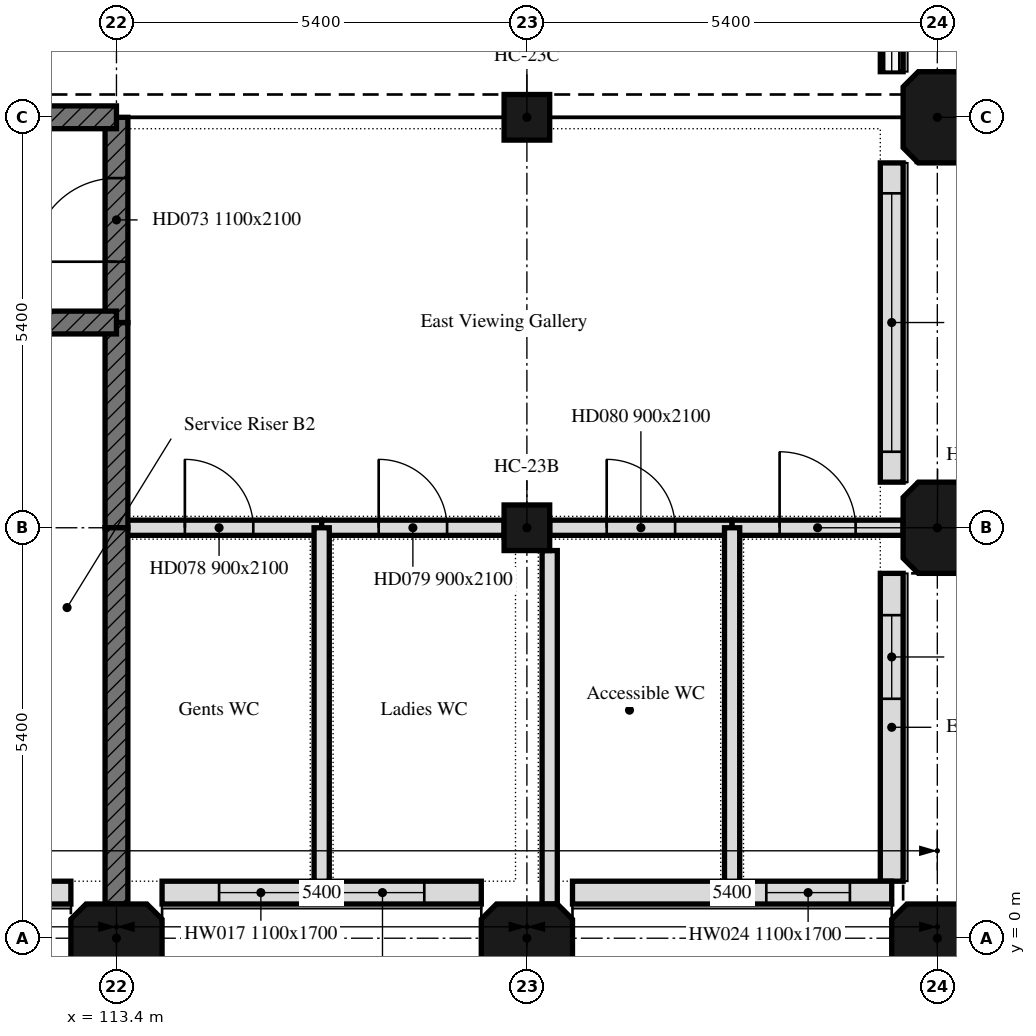
"""IFC4 building model, lengths in metres.
Left out: names, types, materials, properties, quantities, classifications, styles, units other than length and angle.
Written with IfcOpenShell. Run it as: python <this file> out.ifc"""

import sys

from ifc_helpers import new_model, si_unit, direction, frame, frame_2d, origin, origin_2d, place, context, subcontext, project, spatial, polyline, rectangle, outline, extrude, element, fill, save


model = new_model("IFC4")
c1 = context("Model", 3, precision=1e-05, world=origin(), true_north=direction((0.0, 1.0)))
c2 = subcontext(c1, "Body", "Model", "MODEL_VIEW")
j1 = project(units=[si_unit("LENGTHUNIT", "METRE"), si_unit("PLANEANGLEUNIT", "RADIAN")], contexts=[c1])
p1 = place(None, origin())
s1 = spatial("IfcSite", under=j1, at=p1, CompositionType="ELEMENT")
p2 = place(p1, origin())
s2 = spatial("IfcBuilding", under=s1, at=p2, CompositionType="ELEMENT")
p3 = place(p2, frame((0.0, 0.0, 19.8)))
s3 = spatial("IfcBuildingStorey", under=s2, at=p3, CompositionType="ELEMENT", Elevation=19.8)
for number, where, z_axis, x_axis in (
    (1, (113.4, 0.0, 0.0), (0.0, 0.0, 1.0), (1.0, 0.0, 0.0)),
    (2, (118.8, 0.0, 0.0), (0.0, 0.0, 1.0), (1.0, 0.0, 0.0)),
):
    element("IfcColumn", number, at=place(p3, frame(where, z_axis=z_axis, x_axis=x_axis)), inside=s3, PredefinedType="COLUMN", context=c2, shape_type="SweptSolid", body=[
        extrude(outline(polyline([(-0.4, -0.45), (0.4, -0.45), (0.6, -0.25), (0.6, 0.25), (0.4, 0.45), (-0.4, 0.45), (-0.6, 0.25), (-0.6, -0.25), (-0.4, -0.45)])), origin(), (0.0, 0.0, 1.0), 3.802),
    ])
for number, where, z_axis, x_axis in (
    (3, (118.8, 5.4, 0.0), (0.0, 0.0, 1.0), (1.0, 0.0, 0.0)),
    (4, (118.8, 10.8, 0.0), (0.0, 0.0, 1.0), (1.0, 0.0, 0.0)),
):
    element("IfcColumn", number, at=place(p3, frame(where, z_axis=z_axis, x_axis=x_axis)), inside=s3, PredefinedType="COLUMN", context=c2, shape_type="SweptSolid", body=[
        extrude(rectangle(XDim=0.6, YDim=0.6, at=origin_2d()), origin(), (0.0, 0.0, 1.0), 4.8),
    ])
p4 = place(p3, frame((124.2, 0.0, 0.0), z_axis=(0.0, 0.0, 1.0), x_axis=(1.0, 0.0, 0.0)))
e5 = element("IfcColumn", 5, at=p4, inside=s3, PredefinedType="COLUMN", context=c2, shape_type="SweptSolid", body=[
    extrude(outline(polyline([(-0.4, -0.45), (0.4, -0.45), (0.6, -0.25), (0.6, 0.25), (0.4, 0.45), (-0.4, 0.45), (-0.6, 0.25), (-0.6, -0.25), (-0.4, -0.45)])), origin(), (0.0, 0.0, 1.0), 3.802),
])
for number, where, z_axis, x_axis in (
    (6, (124.2, 5.4, 0.0), (0.0, 0.0, 1.0), (0.0, 1.0, 0.0)),
    (7, (124.2, 10.8, 0.0), (0.0, 0.0, 1.0), (0.0, 1.0, 0.0)),
):
    element("IfcColumn", number, at=place(p3, frame(where, z_axis=z_axis, x_axis=x_axis)), inside=s3, PredefinedType="COLUMN", context=c2, shape_type="SweptSolid", body=[
        extrude(outline(polyline([(-0.4, -0.45), (0.4, -0.45), (0.6, -0.25), (0.6, 0.25), (0.4, 0.45), (-0.4, 0.45), (-0.6, 0.25), (-0.6, -0.25), (-0.4, -0.45)])), origin(), (0.0, 0.0, 1.0), 4.8),
    ])
p5 = place(p3, frame((108.6, 0.6, 0.0), z_axis=(0.0, 0.0, 1.0), x_axis=(1.0, 0.0, 0.0)))
e8 = element("IfcWall", 8, at=p5, inside=s3, PredefinedType="SOLIDWALL", context=c2, shape_type="SweptSolid", body=[
    extrude(outline(polyline([(0.0, 0.0), (4.2, 0.0), (4.2, 5.365), (0.0, 5.365), (0.0, 0.0)])), frame((0.0, 0.15, 0.0), z_axis=(0.0, -1.0, 0.0), x_axis=(1.0, 0.0, 0.0)), (0.0, 0.0, 1.0), 0.3),
])
p6 = place(p3, frame((114.0, 0.6, 0.0), z_axis=(0.0, 0.0, 1.0), x_axis=(1.0, 0.0, 0.0)))
e9 = element("IfcWall", 9, at=p6, inside=s3, PredefinedType="SOLIDWALL", context=c2, shape_type="SweptSolid", body=[
    extrude(outline(polyline([(0.0, 0.0), (4.2, 0.0), (4.2, 5.365), (0.0, 5.365), (0.0, 0.0)])), frame((0.0, 0.15, 0.0), z_axis=(0.0, -1.0, 0.0), x_axis=(1.0, 0.0, 0.0)), (0.0, 0.0, 1.0), 0.3),
])
p7 = place(p6, frame((0.75, 0.0, 0.9)))
e10 = element("IfcOpeningElement", 10, at=p7, cuts=e9, PredefinedType="OPENING", context=c2, shape_type="SweptSolid", body=[
    extrude(rectangle(XDim=1.1, YDim=1.7, at=frame_2d((0.55, 0.85))), frame((0.0, 0.15, 0.0), z_axis=(0.0, -1.0, 0.0), x_axis=(1.0, 0.0, 0.0)), (0.0, 0.0, 1.0), 0.3),
])
p8 = place(p6, frame((2.35, 0.0, 0.9)))
e11 = element("IfcOpeningElement", 11, at=p8, cuts=e9, PredefinedType="OPENING", context=c2, shape_type="SweptSolid", body=[
    extrude(rectangle(XDim=1.1, YDim=1.7, at=frame_2d((0.55, 0.85))), frame((0.0, 0.15, 0.0), z_axis=(0.0, -1.0, 0.0), x_axis=(1.0, 0.0, 0.0)), (0.0, 0.0, 1.0), 0.3),
])
p9 = place(p3, frame((119.4, 0.6, 0.0), z_axis=(0.0, 0.0, 1.0), x_axis=(1.0, 0.0, 0.0)))
e12 = element("IfcWall", 12, at=p9, inside=s3, PredefinedType="SOLIDWALL", context=c2, shape_type="SweptSolid", body=[
    extrude(outline(polyline([(0.0, 0.0), (4.2, 0.0), (4.2, 5.365), (0.0, 5.365), (0.0, 0.0)])), frame((0.0, 0.15, 0.0), z_axis=(0.0, -1.0, 0.0), x_axis=(1.0, 0.0, 0.0)), (0.0, 0.0, 1.0), 0.3),
])
p10 = place(p9, frame((2.55, 0.0, 0.9)))
e13 = element("IfcOpeningElement", 13, at=p10, cuts=e12, PredefinedType="OPENING", context=c2, shape_type="SweptSolid", body=[
    extrude(rectangle(XDim=1.1, YDim=1.7, at=frame_2d((0.55, 0.85))), frame((0.0, 0.15, 0.0), z_axis=(0.0, -1.0, 0.0), x_axis=(1.0, 0.0, 0.0)), (0.0, 0.0, 1.0), 0.3),
])
p11 = place(p3, frame((123.6, 0.75, 0.0), z_axis=(0.0, 0.0, 1.0), x_axis=(0.0, 1.0, 0.0)))
e14 = element("IfcWall", 14, at=p11, inside=s3, PredefinedType="SOLIDWALL", context=c2, shape_type="SweptSolid", body=[
    extrude(outline(polyline([(0.0, 0.0), (4.05, 0.0), (4.05, 6.271), (0.0, 5.185), (0.0, 0.0)])), frame((0.0, 0.15, 0.0), z_axis=(0.0, -1.0, 0.0), x_axis=(1.0, 0.0, 0.0)), (0.0, 0.0, 1.0), 0.3),
])
p12 = place(p11, frame((2.4, 0.0, 0.9)))
e15 = element("IfcOpeningElement", 15, at=p12, cuts=e14, PredefinedType="OPENING", context=c2, shape_type="SweptSolid", body=[
    extrude(rectangle(XDim=1.1, YDim=1.7, at=frame_2d((0.55, 0.85))), frame((0.0, 0.15, 0.0), z_axis=(0.0, -1.0, 0.0), x_axis=(1.0, 0.0, 0.0)), (0.0, 0.0, 1.0), 0.3),
])
p13 = place(p3, frame((123.6, 6.0, 0.0), z_axis=(0.0, 0.0, 1.0), x_axis=(0.0, 1.0, 0.0)))
e16 = element("IfcWall", 16, at=p13, inside=s3, PredefinedType="SOLIDWALL", context=c2, shape_type="SweptSolid", body=[
    extrude(outline(polyline([(0.0, 0.0), (4.2, 0.0), (4.2, 7.718), (0.0, 6.592), (0.0, 0.0)])), frame((0.0, 0.15, 0.0), z_axis=(0.0, -1.0, 0.0), x_axis=(1.0, 0.0, 0.0)), (0.0, 0.0, 1.0), 0.3),
])
p14 = place(p13, frame((0.4, 0.0, 0.9)))
e17 = element("IfcOpeningElement", 17, at=p14, cuts=e16, PredefinedType="OPENING", context=c2, shape_type="SweptSolid", body=[
    extrude(rectangle(XDim=3.4, YDim=1.7, at=frame_2d((1.7, 0.85))), frame((0.0, 0.15, 0.0), z_axis=(0.0, -1.0, 0.0), x_axis=(1.0, 0.0, 0.0)), (0.0, 0.0, 1.0), 0.3),
])
p15 = place(p3, frame((123.6, 11.4, 0.0), z_axis=(0.0, 0.0, 1.0), x_axis=(0.0, 1.0, 0.0)))
e18 = element("IfcWall", 18, at=p15, inside=s3, PredefinedType="SOLIDWALL", context=c2, shape_type="SweptSolid", body=[
    extrude(rectangle(XDim=4.2, YDim=0.3, at=frame_2d((2.1, 0.0))), origin(), (0.0, 0.0, 1.0), 3.2),
])
p16 = place(p3, frame((113.4, 5.4, 0.0), z_axis=(0.0, 0.0, 1.0), x_axis=(1.0, 0.0, 0.0)))
e19 = element("IfcWall", 19, at=p16, inside=s3, PredefinedType="PARTITIONING", context=c2, shape_type="SweptSolid", body=[
    extrude(rectangle(XDim=2.7, YDim=0.2, at=frame_2d((1.35, 0.0))), origin(), (0.0, 0.0, 1.0), 5.317),
])
p17 = place(p16, frame((0.9, 0.0, 0.0)))
e20 = element("IfcOpeningElement", 20, at=p17, cuts=e19, PredefinedType="OPENING", context=c2, shape_type="SweptSolid", body=[
    extrude(rectangle(XDim=0.9, YDim=2.1, at=frame_2d((0.45, 1.05))), frame((0.0, 0.1, 0.0), z_axis=(0.0, -1.0, 0.0), x_axis=(1.0, 0.0, 0.0)), (0.0, 0.0, 1.0), 0.2),
])
p18 = place(p3, frame((116.1, 5.4, 0.0), z_axis=(0.0, 0.0, 1.0), x_axis=(1.0, 0.0, 0.0)))
e21 = element("IfcWall", 21, at=p18, inside=s3, PredefinedType="PARTITIONING", context=c2, shape_type="SweptSolid", body=[
    extrude(rectangle(XDim=2.4, YDim=0.2, at=frame_2d((1.2, 0.0))), origin(), (0.0, 0.0, 1.0), 5.317),
])
p19 = place(p18, frame((0.75, 0.0, 0.0)))
e22 = element("IfcOpeningElement", 22, at=p19, cuts=e21, PredefinedType="OPENING", context=c2, shape_type="SweptSolid", body=[
    extrude(rectangle(XDim=0.9, YDim=2.1, at=frame_2d((0.45, 1.05))), frame((0.0, 0.1, 0.0), z_axis=(0.0, -1.0, 0.0), x_axis=(1.0, 0.0, 0.0)), (0.0, 0.0, 1.0), 0.2),
])
p20 = place(p3, frame((119.1, 5.4, 0.0), z_axis=(0.0, 0.0, 1.0), x_axis=(1.0, 0.0, 0.0)))
e23 = element("IfcWall", 23, at=p20, inside=s3, PredefinedType="PARTITIONING", context=c2, shape_type="SweptSolid", body=[
    extrude(rectangle(XDim=2.4, YDim=0.2, at=frame_2d((1.2, 0.0))), origin(), (0.0, 0.0, 1.0), 5.317),
])
p21 = place(p20, frame((0.75, 0.0, 0.0)))
e24 = element("IfcOpeningElement", 24, at=p21, cuts=e23, PredefinedType="OPENING", context=c2, shape_type="SweptSolid", body=[
    extrude(rectangle(XDim=0.9, YDim=2.1, at=frame_2d((0.45, 1.05))), frame((0.0, 0.1, 0.0), z_axis=(0.0, -1.0, 0.0), x_axis=(1.0, 0.0, 0.0)), (0.0, 0.0, 1.0), 0.2),
])
p22 = place(p3, frame((121.5, 5.4, 0.0), z_axis=(0.0, 0.0, 1.0), x_axis=(1.0, 0.0, 0.0)))
e25 = element("IfcWall", 25, at=p22, inside=s3, PredefinedType="PARTITIONING", context=c2, shape_type="SweptSolid", body=[
    extrude(rectangle(XDim=2.25, YDim=0.2, at=frame_2d((1.125, 0.0))), origin(), (0.0, 0.0, 1.0), 5.317),
])
p23 = place(p22, frame((0.625, 0.0, 0.0)))
e26 = element("IfcOpeningElement", 26, at=p23, cuts=e25, PredefinedType="OPENING", context=c2, shape_type="SweptSolid", body=[
    extrude(rectangle(XDim=1.0, YDim=2.1, at=frame_2d((0.5, 1.05))), frame((0.0, 0.1, 0.0), z_axis=(0.0, -1.0, 0.0), x_axis=(1.0, 0.0, 0.0)), (0.0, 0.0, 1.0), 0.2),
])
p24 = place(p3, frame((113.4, 5.4, 0.0), z_axis=(0.0, 0.0, 1.0), x_axis=(0.0, 1.0, 0.0)))
e27 = element("IfcWall", 27, at=p24, inside=s3, PredefinedType="SHEAR", context=c2, shape_type="SweptSolid", body=[
    extrude(outline(polyline([(0.0, 0.0), (2.7, 0.0), (2.7, 6.067), (0.0, 5.344), (0.0, 0.0)])), frame((0.0, 0.15, 0.0), z_axis=(0.0, -1.0, 0.0), x_axis=(1.0, 0.0, 0.0)), (0.0, 0.0, 1.0), 0.3),
])
p25 = place(p3, frame((113.4, 8.1, 0.0), z_axis=(0.0, 0.0, 1.0), x_axis=(0.0, 1.0, 0.0)))
e28 = element("IfcWall", 28, at=p25, inside=s3, PredefinedType="SHEAR", context=c2, shape_type="SweptSolid", body=[
    extrude(outline(polyline([(0.0, 0.0), (2.7, 0.0), (2.7, 6.791), (0.0, 6.067), (0.0, 0.0)])), frame((0.0, 0.15, 0.0), z_axis=(0.0, -1.0, 0.0), x_axis=(1.0, 0.0, 0.0)), (0.0, 0.0, 1.0), 0.3),
])
p26 = place(p25, frame((0.8, 0.0, 0.0)))
e29 = element("IfcOpeningElement", 29, at=p26, cuts=e28, PredefinedType="OPENING", context=c2, shape_type="SweptSolid", body=[
    extrude(rectangle(XDim=1.1, YDim=2.1, at=frame_2d((0.55, 1.05))), frame((0.0, 0.15, 0.0), z_axis=(0.0, -1.0, 0.0), x_axis=(1.0, 0.0, 0.0)), (0.0, 0.0, 1.0), 0.3),
])
p27 = place(p3, frame((116.1, 0.75, 0.0), z_axis=(0.0, 0.0, 1.0), x_axis=(0.0, 1.0, 0.0)))
e30 = element("IfcWall", 30, at=p27, inside=s3, PredefinedType="PARTITIONING", context=c2, shape_type="SweptSolid", body=[
    extrude(outline(polyline([(0.0, 0.0), (4.65, 0.0), (4.65, 5.344), (0.0, 4.098), (0.0, 0.0)])), frame((0.0, 0.1, 0.0), z_axis=(0.0, -1.0, 0.0), x_axis=(1.0, 0.0, 0.0)), (0.0, 0.0, 1.0), 0.2),
])
p28 = place(p3, frame((113.4, 0.45, 0.0), z_axis=(0.0, 0.0, 1.0), x_axis=(0.0, 1.0, 0.0)))
e31 = element("IfcWall", 31, at=p28, inside=s3, PredefinedType="SHEAR", context=c2, shape_type="SweptSolid", body=[
    extrude(outline(polyline([(0.0, 0.0), (4.95, 0.0), (4.95, 5.344), (0.0, 4.018), (0.0, 0.0)])), frame((0.0, 0.15, 0.0), z_axis=(0.0, -1.0, 0.0), x_axis=(1.0, 0.0, 0.0)), (0.0, 0.0, 1.0), 0.3),
])
p29 = place(p3, frame((119.1, 0.45, 0.0), z_axis=(0.0, 0.0, 1.0), x_axis=(0.0, 1.0, 0.0)))
e32 = element("IfcWall", 32, at=p29, inside=s3, PredefinedType="PARTITIONING", context=c2, shape_type="SweptSolid", body=[
    extrude(outline(polyline([(0.0, 0.0), (4.65, 0.0), (4.65, 5.264), (0.0, 4.018), (0.0, 0.0)])), frame((0.0, 0.1, 0.0), z_axis=(0.0, -1.0, 0.0), x_axis=(1.0, 0.0, 0.0)), (0.0, 0.0, 1.0), 0.2),
])
p30 = place(p3, frame((121.5, 0.75, 0.0), z_axis=(0.0, 0.0, 1.0), x_axis=(0.0, 1.0, 0.0)))
e33 = element("IfcWall", 33, at=p30, inside=s3, PredefinedType="PARTITIONING", context=c2, shape_type="SweptSolid", body=[
    extrude(outline(polyline([(0.0, 0.0), (4.65, 0.0), (4.65, 5.344), (0.0, 4.098), (0.0, 0.0)])), frame((0.0, 0.1, 0.0), z_axis=(0.0, -1.0, 0.0), x_axis=(1.0, 0.0, 0.0)), (0.0, 0.0, 1.0), 0.2),
])
p31 = place(p3, frame((112.1, 8.1, 0.0), z_axis=(0.0, 0.0, 1.0), x_axis=(1.0, 0.0, 0.0)))
e34 = element("IfcWall", 34, at=p31, inside=s3, PredefinedType="SHEAR", context=c2, shape_type="SweptSolid", body=[
    extrude(rectangle(XDim=1.3, YDim=0.3, at=frame_2d((0.65, 0.0))), origin(), (0.0, 0.0, 1.0), 6.027),
])
p32 = place(p3, frame((102.6, 10.8, 0.0), z_axis=(0.0, 0.0, 1.0), x_axis=(1.0, 0.0, 0.0)))
e35 = element("IfcWall", 35, at=p32, inside=s3, PredefinedType="SHEAR", context=c2, shape_type="SweptSolid", body=[
    extrude(rectangle(XDim=10.8, YDim=0.3, at=frame_2d((5.4, 0.0))), origin(), (0.0, 0.0, 1.0), 6.751),
])
p33 = place(p7, origin())
e36 = element("IfcWindow", 36, at=p33, inside=s3, PartitioningType="SINGLE_PANEL", PredefinedType="WINDOW", context=c2, shape_type="SweptSolid", body=[
    extrude(rectangle(XDim=1.1, YDim=1.7, at=frame_2d((0.55, 0.85))), frame((0.0, 0.03, 0.0), z_axis=(0.0, -1.0, 0.0), x_axis=(1.0, 0.0, 0.0)), (0.0, 0.0, 1.0), 0.06),
])
fill(e10, e36)
p34 = place(p8, origin())
e37 = element("IfcWindow", 37, at=p34, inside=s3, PartitioningType="SINGLE_PANEL", PredefinedType="WINDOW", context=c2, shape_type="SweptSolid", body=[
    extrude(rectangle(XDim=1.1, YDim=1.7, at=frame_2d((0.55, 0.85))), frame((0.0, 0.03, 0.0), z_axis=(0.0, -1.0, 0.0), x_axis=(1.0, 0.0, 0.0)), (0.0, 0.0, 1.0), 0.06),
])
fill(e11, e37)
p35 = place(p10, origin())
e38 = element("IfcWindow", 38, at=p35, inside=s3, PartitioningType="SINGLE_PANEL", PredefinedType="WINDOW", context=c2, shape_type="SweptSolid", body=[
    extrude(rectangle(XDim=1.1, YDim=1.7, at=frame_2d((0.55, 0.85))), frame((0.0, 0.03, 0.0), z_axis=(0.0, -1.0, 0.0), x_axis=(1.0, 0.0, 0.0)), (0.0, 0.0, 1.0), 0.06),
])
fill(e13, e38)
p36 = place(p12, origin())
e39 = element("IfcWindow", 39, at=p36, inside=s3, PartitioningType="SINGLE_PANEL", PredefinedType="WINDOW", context=c2, shape_type="SweptSolid", body=[
    extrude(rectangle(XDim=1.1, YDim=1.7, at=frame_2d((0.55, 0.85))), frame((0.0, 0.03, 0.0), z_axis=(0.0, -1.0, 0.0), x_axis=(1.0, 0.0, 0.0)), (0.0, 0.0, 1.0), 0.06),
])
fill(e15, e39)
p37 = place(p14, origin())
e40 = element("IfcWindow", 40, at=p37, inside=s3, PartitioningType="SINGLE_PANEL", PredefinedType="WINDOW", context=c2, shape_type="SweptSolid", body=[
    extrude(rectangle(XDim=3.4, YDim=1.7, at=frame_2d((1.7, 0.85))), frame((0.0, 0.03, 0.0), z_axis=(0.0, -1.0, 0.0), x_axis=(1.0, 0.0, 0.0)), (0.0, 0.0, 1.0), 0.06),
])
fill(e17, e40)
p38 = place(p26, origin())
e41 = element("IfcDoor", 41, at=p38, inside=s3, OperationType="SINGLE_SWING_LEFT", PredefinedType="DOOR", context=c2, shape_type="SweptSolid", body=[
    extrude(rectangle(XDim=1.1, YDim=2.1, at=frame_2d((0.55, 1.05))), frame((0.0, 0.025, 0.0), z_axis=(0.0, -1.0, 0.0), x_axis=(1.0, 0.0, 0.0)), (0.0, 0.0, 1.0), 0.05),
])
fill(e29, e41)
p39 = place(p17, origin())
e42 = element("IfcDoor", 42, at=p39, inside=s3, OperationType="SINGLE_SWING_LEFT", PredefinedType="DOOR", context=c2, shape_type="SweptSolid", body=[
    extrude(rectangle(XDim=0.9, YDim=2.1, at=frame_2d((0.45, 1.05))), frame((0.0, 0.025, 0.0), z_axis=(0.0, -1.0, 0.0), x_axis=(1.0, 0.0, 0.0)), (0.0, 0.0, 1.0), 0.05),
])
fill(e20, e42)
p40 = place(p19, origin())
e43 = element("IfcDoor", 43, at=p40, inside=s3, OperationType="SINGLE_SWING_LEFT", PredefinedType="DOOR", context=c2, shape_type="SweptSolid", body=[
    extrude(rectangle(XDim=0.9, YDim=2.1, at=frame_2d((0.45, 1.05))), frame((0.0, 0.025, 0.0), z_axis=(0.0, -1.0, 0.0), x_axis=(1.0, 0.0, 0.0)), (0.0, 0.0, 1.0), 0.05),
])
fill(e22, e43)
p41 = place(p21, origin())
e44 = element("IfcDoor", 44, at=p41, inside=s3, OperationType="SINGLE_SWING_LEFT", PredefinedType="DOOR", context=c2, shape_type="SweptSolid", body=[
    extrude(rectangle(XDim=0.9, YDim=2.1, at=frame_2d((0.45, 1.05))), frame((0.0, 0.025, 0.0), z_axis=(0.0, -1.0, 0.0), x_axis=(1.0, 0.0, 0.0)), (0.0, 0.0, 1.0), 0.05),
])
fill(e24, e44)
p42 = place(p23, origin())
e45 = element("IfcDoor", 45, at=p42, inside=s3, OperationType="SINGLE_SWING_LEFT", PredefinedType="DOOR", context=c2, shape_type="SweptSolid", body=[
    extrude(rectangle(XDim=1.0, YDim=2.1, at=frame_2d((0.5, 1.05))), frame((0.0, 0.025, 0.0), z_axis=(0.0, -1.0, 0.0), x_axis=(1.0, 0.0, 0.0)), (0.0, 0.0, 1.0), 0.05),
])
fill(e26, e45)
save(model, sys.argv[1])
